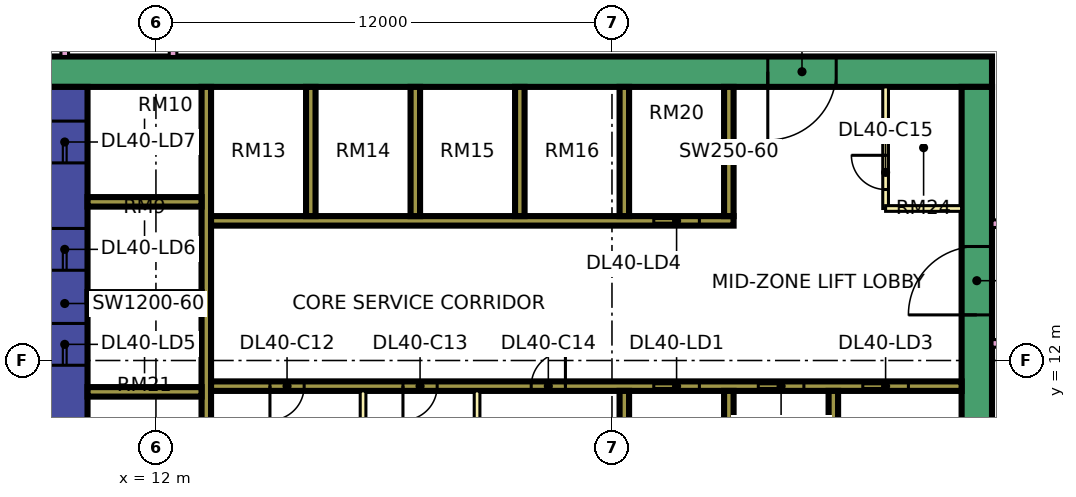
"""IFC4 building model, lengths in metres.
Left out: names, types, materials, properties, quantities, classifications, styles, units other than length and angle.
Written with IfcOpenShell. Run it as: python <this file> out.ifc"""

import sys

from ifc_helpers import new_model, si_unit, direction, frame, frame_2d, origin, place, context, subcontext, project, spatial, rectangle, extrude, element, fill, save


model = new_model("IFC4")
c1 = context("Model", 3, precision=1e-05, world=origin(), true_north=direction((0.0, 1.0)))
c2 = subcontext(c1, "Body", "Model", "MODEL_VIEW")
j1 = project(units=[si_unit("LENGTHUNIT", "METRE"), si_unit("PLANEANGLEUNIT", "RADIAN")], contexts=[c1])
p1 = place(None, origin())
s1 = spatial("IfcSite", under=j1, at=p1, CompositionType="ELEMENT")
p2 = place(p1, origin())
s2 = spatial("IfcBuilding", under=s1, at=p2, CompositionType="ELEMENT")
p3 = place(p2, frame((0.0, 0.0, 176.15)))
s3 = spatial("IfcBuildingStorey", under=s2, at=p3, CompositionType="ELEMENT", Elevation=176.15)
p4 = place(p3, frame((9.0, 19.6, 0.0), z_axis=(0.0, 0.0, 1.0), x_axis=(1.0, 0.0, 0.0)))
e1 = element("IfcWall", 1, at=p4, inside=s3, PredefinedType="SHEAR", context=c2, shape_type="SweptSolid", body=[
    extrude(rectangle(XDim=25.0, YDim=0.8, at=frame_2d((12.5, 0.0))), origin(), (0.0, 0.0, 1.0), 3.75),
])
p5 = place(p4, frame((19.1, 0.0, 0.0)))
e2 = element("IfcOpeningElement", 2, at=p5, cuts=e1, PredefinedType="OPENING", context=c2, shape_type="SweptSolid", body=[
    extrude(rectangle(XDim=1.8, YDim=2.4, at=frame_2d((0.9, 1.2))), frame((0.0, 0.41, 0.0), z_axis=(0.0, -1.0, 0.0), x_axis=(1.0, 0.0, 0.0)), (0.0, 0.0, 1.0), 0.82),
])
p6 = place(p3, frame((9.6, 7.8, 0.0), z_axis=(0.0, 0.0, 1.0), x_axis=(0.0, 1.0, 0.0)))
e3 = element("IfcWall", 3, at=p6, inside=s3, PredefinedType="SHEAR", context=c2, shape_type="SweptSolid", body=[
    extrude(rectangle(XDim=11.4, YDim=1.2, at=frame_2d((5.7, 0.0))), origin(), (0.0, 0.0, 1.0), 3.75),
])
p7 = place(p6, frame((4.075, 0.0, 0.0)))
e4 = element("IfcOpeningElement", 4, at=p7, cuts=e3, PredefinedType="OPENING", context=c2, shape_type="SweptSolid", body=[
    extrude(rectangle(XDim=1.1, YDim=2.2, at=frame_2d((0.55, 1.1))), frame((0.0, 0.61, 0.0), z_axis=(0.0, -1.0, 0.0), x_axis=(1.0, 0.0, 0.0)), (0.0, 0.0, 1.0), 1.22),
])
p8 = place(p6, frame((6.575, 0.0, 0.0)))
e5 = element("IfcOpeningElement", 5, at=p8, cuts=e3, PredefinedType="OPENING", context=c2, shape_type="SweptSolid", body=[
    extrude(rectangle(XDim=1.1, YDim=2.2, at=frame_2d((0.55, 1.1))), frame((0.0, 0.61, 0.0), z_axis=(0.0, -1.0, 0.0), x_axis=(1.0, 0.0, 0.0)), (0.0, 0.0, 1.0), 1.22),
])
p9 = place(p6, frame((9.4, 0.0, 0.0)))
e6 = element("IfcOpeningElement", 6, at=p9, cuts=e3, PredefinedType="OPENING", context=c2, shape_type="SweptSolid", body=[
    extrude(rectangle(XDim=1.1, YDim=2.2, at=frame_2d((0.55, 1.1))), frame((0.0, 0.61, 0.0), z_axis=(0.0, -1.0, 0.0), x_axis=(1.0, 0.0, 0.0)), (0.0, 0.0, 1.0), 1.22),
])
p10 = place(p6, frame((1.75, 0.0, 0.0)))
e7 = element("IfcOpeningElement", 7, at=p10, cuts=e3, PredefinedType="OPENING", context=c2, shape_type="SweptSolid", body=[
    extrude(rectangle(XDim=0.9, YDim=2.1, at=frame_2d((0.45, 1.05))), frame((0.0, 0.61, 0.0), z_axis=(0.0, -1.0, 0.0), x_axis=(1.0, 0.0, 0.0)), (0.0, 0.0, 1.0), 1.22),
])
p11 = place(p3, frame((33.6, 7.8, 0.0), z_axis=(0.0, 0.0, 1.0), x_axis=(0.0, 1.0, 0.0)))
e8 = element("IfcWall", 8, at=p11, inside=s3, PredefinedType="SHEAR", context=c2, shape_type="SweptSolid", body=[
    extrude(rectangle(XDim=11.4, YDim=0.8, at=frame_2d((5.7, 0.0))), origin(), (0.0, 0.0, 1.0), 3.75),
])
p12 = place(p11, frame((5.4, 0.0, 0.0)))
e9 = element("IfcOpeningElement", 9, at=p12, cuts=e8, PredefinedType="OPENING", context=c2, shape_type="SweptSolid", body=[
    extrude(rectangle(XDim=1.8, YDim=2.4, at=frame_2d((0.9, 1.2))), frame((0.0, 0.41, 0.0), z_axis=(0.0, -1.0, 0.0), x_axis=(1.0, 0.0, 0.0)), (0.0, 0.0, 1.0), 0.82),
])
p13 = place(p3, frame((13.325, 7.8, 0.0), z_axis=(0.0, 0.0, 1.0), x_axis=(0.0, 1.0, 0.0)))
e10 = element("IfcWall", 10, at=p13, inside=s3, PredefinedType="SHEAR", context=c2, shape_type="SweptSolid", body=[
    extrude(rectangle(XDim=11.4, YDim=0.25, at=frame_2d((5.7, 0.0))), origin(), (0.0, 0.0, 1.0), 3.75),
])
p14 = place(p3, frame((13.45, 11.325, 0.0), z_axis=(0.0, 0.0, 1.0), x_axis=(1.0, 0.0, 0.0)))
e11 = element("IfcWall", 11, at=p14, inside=s3, PredefinedType="SHEAR", context=c2, shape_type="SweptSolid", body=[
    extrude(rectangle(XDim=19.75, YDim=0.25, at=frame_2d((9.875, 0.0))), origin(), (0.0, 0.0, 1.0), 3.75),
])
p15 = place(p14, frame((11.65, 0.0, 0.0)))
e12 = element("IfcOpeningElement", 12, at=p15, cuts=e11, PredefinedType="OPENING", context=c2, shape_type="SweptSolid", body=[
    extrude(rectangle(XDim=1.2, YDim=2.2, at=frame_2d((0.6, 1.1))), frame((0.0, 0.135, 0.0), z_axis=(0.0, -1.0, 0.0), x_axis=(1.0, 0.0, 0.0)), (0.0, 0.0, 1.0), 0.27),
])
p16 = place(p14, frame((14.4, 0.0, 0.0)))
e13 = element("IfcOpeningElement", 13, at=p16, cuts=e11, PredefinedType="OPENING", context=c2, shape_type="SweptSolid", body=[
    extrude(rectangle(XDim=1.2, YDim=2.2, at=frame_2d((0.6, 1.1))), frame((0.0, 0.135, 0.0), z_axis=(0.0, -1.0, 0.0), x_axis=(1.0, 0.0, 0.0)), (0.0, 0.0, 1.0), 0.27),
])
p17 = place(p14, frame((17.15, 0.0, 0.0)))
e14 = element("IfcOpeningElement", 14, at=p17, cuts=e11, PredefinedType="OPENING", context=c2, shape_type="SweptSolid", body=[
    extrude(rectangle(XDim=1.2, YDim=2.2, at=frame_2d((0.6, 1.1))), frame((0.0, 0.135, 0.0), z_axis=(0.0, -1.0, 0.0), x_axis=(1.0, 0.0, 0.0)), (0.0, 0.0, 1.0), 0.27),
])
p18 = place(p14, frame((1.55, 0.0, 0.0)))
e15 = element("IfcOpeningElement", 15, at=p18, cuts=e11, PredefinedType="OPENING", context=c2, shape_type="SweptSolid", body=[
    extrude(rectangle(XDim=0.9, YDim=2.1, at=frame_2d((0.45, 1.05))), frame((0.0, 0.135, 0.0), z_axis=(0.0, -1.0, 0.0), x_axis=(1.0, 0.0, 0.0)), (0.0, 0.0, 1.0), 0.27),
])
p19 = place(p14, frame((5.05, 0.0, 0.0)))
e16 = element("IfcOpeningElement", 16, at=p19, cuts=e11, PredefinedType="OPENING", context=c2, shape_type="SweptSolid", body=[
    extrude(rectangle(XDim=0.9, YDim=2.1, at=frame_2d((0.45, 1.05))), frame((0.0, 0.135, 0.0), z_axis=(0.0, -1.0, 0.0), x_axis=(1.0, 0.0, 0.0)), (0.0, 0.0, 1.0), 0.27),
])
p20 = place(p14, frame((8.425, 0.0, 0.0)))
e17 = element("IfcOpeningElement", 17, at=p20, cuts=e11, PredefinedType="OPENING", context=c2, shape_type="SweptSolid", body=[
    extrude(rectangle(XDim=0.9, YDim=2.1, at=frame_2d((0.45, 1.05))), frame((0.0, 0.135, 0.0), z_axis=(0.0, -1.0, 0.0), x_axis=(1.0, 0.0, 0.0)), (0.0, 0.0, 1.0), 0.27),
])
p21 = place(p3, frame((13.45, 15.675, 0.0), z_axis=(0.0, 0.0, 1.0), x_axis=(1.0, 0.0, 0.0)))
e18 = element("IfcWall", 18, at=p21, inside=s3, PredefinedType="SHEAR", context=c2, shape_type="SweptSolid", body=[
    extrude(rectangle(XDim=13.75, YDim=0.25, at=frame_2d((6.875, 0.0))), origin(), (0.0, 0.0, 1.0), 3.75),
])
p22 = place(p21, frame((11.65, 0.0, 0.0)))
e19 = element("IfcOpeningElement", 19, at=p22, cuts=e18, PredefinedType="OPENING", context=c2, shape_type="SweptSolid", body=[
    extrude(rectangle(XDim=1.2, YDim=2.2, at=frame_2d((0.6, 1.1))), frame((0.0, 0.135, 0.0), z_axis=(0.0, -1.0, 0.0), x_axis=(1.0, 0.0, 0.0)), (0.0, 0.0, 1.0), 0.27),
])
for number, where, z_axis, x_axis in (
    (20, (10.2, 11.175, 0.0), (0.0, 0.0, 1.0), (1.0, 0.0, 0.0)),
    (21, (10.2, 13.675, 0.0), (0.0, 0.0, 1.0), (1.0, 0.0, 0.0)),
    (22, (10.2, 16.175, 0.0), (0.0, 0.0, 1.0), (1.0, 0.0, 0.0)),
):
    element("IfcWall", number, at=place(p3, frame(where, z_axis=z_axis, x_axis=x_axis)), inside=s3, PredefinedType="SHEAR", context=c2, shape_type="SweptSolid", body=[
        extrude(rectangle(XDim=3.0, YDim=0.25, at=frame_2d((1.5, 0.0))), origin(), (0.0, 0.0, 1.0), 3.75),
    ])
for number, where, z_axis, x_axis in (
    (23, (24.325, 7.8, 0.0), (0.0, 0.0, 1.0), (0.0, 1.0, 0.0)),
    (24, (27.075, 7.8, 0.0), (0.0, 0.0, 1.0), (0.0, 1.0, 0.0)),
    (25, (29.825, 7.8, 0.0), (0.0, 0.0, 1.0), (0.0, 1.0, 0.0)),
    (26, (16.075, 15.8, 0.0), (0.0, 0.0, 1.0), (0.0, 1.0, 0.0)),
    (27, (18.825, 15.8, 0.0), (0.0, 0.0, 1.0), (0.0, 1.0, 0.0)),
    (28, (21.575, 15.8, 0.0), (0.0, 0.0, 1.0), (0.0, 1.0, 0.0)),
    (29, (24.325, 15.8, 0.0), (0.0, 0.0, 1.0), (0.0, 1.0, 0.0)),
    (30, (27.075, 15.8, 0.0), (0.0, 0.0, 1.0), (0.0, 1.0, 0.0)),
):
    element("IfcWall", number, at=place(p3, frame(where, z_axis=z_axis, x_axis=x_axis)), inside=s3, PredefinedType="SHEAR", context=c2, shape_type="SweptSolid", body=[
        extrude(rectangle(XDim=3.4, YDim=0.25, at=frame_2d((1.7, 0.0))), origin(), (0.0, 0.0, 1.0), 3.75),
    ])
p23 = place(p3, frame((-1.447, 12.553, 0.0), z_axis=(0.0, 0.0, 1.0), x_axis=(0.707106781187, -0.707106781187, 0.0)))
e31 = element("IfcWall", 31, at=p23, inside=s3, PredefinedType="SOLIDWALL", context=c2, shape_type="SweptSolid", body=[
    extrude(rectangle(XDim=19.799, YDim=0.15, at=frame_2d((9.899, 0.0))), origin(), (0.0, 0.0, 1.0), 3.35),
])
p24 = place(p23, frame((2.212, 0.0, 0.45)))
e32 = element("IfcOpeningElement", 32, at=p24, cuts=e31, PredefinedType="OPENING", context=c2, shape_type="SweptSolid", body=[
    extrude(rectangle(XDim=3.0, YDim=2.4, at=frame_2d((1.5, 1.2))), frame((0.0, 0.085, 0.0), z_axis=(0.0, -1.0, 0.0), x_axis=(1.0, 0.0, 0.0)), (0.0, 0.0, 1.0), 0.17),
])
p25 = place(p23, frame((10.216, 0.0, 0.45)))
e33 = element("IfcOpeningElement", 33, at=p25, cuts=e31, PredefinedType="OPENING", context=c2, shape_type="SweptSolid", body=[
    extrude(rectangle(XDim=3.0, YDim=2.4, at=frame_2d((1.5, 1.2))), frame((0.0, 0.085, 0.0), z_axis=(0.0, -1.0, 0.0), x_axis=(1.0, 0.0, 0.0)), (0.0, 0.0, 1.0), 0.17),
])
for number, where, z_axis, x_axis in (
    (34, (17.45, 7.8, 0.0), (0.0, 0.0, 1.0), (0.0, 1.0, 0.0)),
    (35, (20.45, 7.8, 0.0), (0.0, 0.0, 1.0), (0.0, 1.0, 0.0)),
):
    element("IfcWall", number, at=place(p3, frame(where, z_axis=z_axis, x_axis=x_axis)), inside=s3, PredefinedType="PARTITIONING", context=c2, shape_type="SweptSolid", body=[
        extrude(rectangle(XDim=3.4, YDim=0.15, at=frame_2d((1.7, 0.0))), origin(), (0.0, 0.0, 1.0), 3.35),
    ])
p26 = place(p3, frame((31.2, 16.0, 0.0), z_axis=(0.0, 0.0, 1.0), x_axis=(0.0, 1.0, 0.0)))
e36 = element("IfcWall", 36, at=p26, inside=s3, PredefinedType="PARTITIONING", context=c2, shape_type="SweptSolid", body=[
    extrude(rectangle(XDim=3.2, YDim=0.15, at=frame_2d((1.6, 0.0))), origin(), (0.0, 0.0, 1.0), 3.35),
])
p27 = place(p26, frame((0.5, 0.0, 0.0)))
e37 = element("IfcOpeningElement", 37, at=p27, cuts=e36, PredefinedType="OPENING", context=c2, shape_type="SweptSolid", body=[
    extrude(rectangle(XDim=0.9, YDim=2.1, at=frame_2d((0.45, 1.05))), frame((0.0, 0.085, 0.0), z_axis=(0.0, -1.0, 0.0), x_axis=(1.0, 0.0, 0.0)), (0.0, 0.0, 1.0), 0.17),
])
p28 = place(p3, frame((31.2, 16.0, 0.0), z_axis=(0.0, 0.0, 1.0), x_axis=(1.0, 0.0, 0.0)))
e38 = element("IfcWall", 38, at=p28, inside=s3, PredefinedType="PARTITIONING", context=c2, shape_type="SweptSolid", body=[
    extrude(rectangle(XDim=2.0, YDim=0.15, at=frame_2d((1.0, 0.0))), origin(), (0.0, 0.0, 1.0), 3.35),
])
p29 = place(p3, frame((9.6, 20.0, 0.0), z_axis=(0.0, 0.0, 1.0), x_axis=(0.0, 1.0, 0.0)))
e39 = element("IfcWall", 39, at=p29, inside=s3, PredefinedType="PARTITIONING", context=c2, shape_type="SweptSolid", body=[
    extrude(rectangle(XDim=42.926, YDim=0.2, at=frame_2d((21.463, 0.0))), origin(), (0.0, 0.0, 1.0), 3.35),
])
p30 = place(p29, frame((31.35, 0.0, 0.0)))
e40 = element("IfcOpeningElement", 40, at=p30, cuts=e39, PredefinedType="OPENING", context=c2, shape_type="SweptSolid", body=[
    extrude(rectangle(XDim=1.0, YDim=2.1, at=frame_2d((0.5, 1.05))), frame((0.0, 0.11, 0.0), z_axis=(0.0, -1.0, 0.0), x_axis=(1.0, 0.0, 0.0)), (0.0, 0.0, 1.0), 0.22),
])
p31 = place(p29, frame((0.6, 0.0, 0.0)))
e41 = element("IfcOpeningElement", 41, at=p31, cuts=e39, PredefinedType="OPENING", context=c2, shape_type="SweptSolid", body=[
    extrude(rectangle(XDim=1.2, YDim=2.1, at=frame_2d((0.6, 1.05))), frame((0.0, 0.11, 0.0), z_axis=(0.0, -1.0, 0.0), x_axis=(1.0, 0.0, 0.0)), (0.0, 0.0, 1.0), 0.22),
])
p32 = place(p29, frame((3.9, 0.0, 0.0)))
e42 = element("IfcOpeningElement", 42, at=p32, cuts=e39, PredefinedType="OPENING", context=c2, shape_type="SweptSolid", body=[
    extrude(rectangle(XDim=1.0, YDim=2.1, at=frame_2d((0.5, 1.05))), frame((0.0, 0.11, 0.0), z_axis=(0.0, -1.0, 0.0), x_axis=(1.0, 0.0, 0.0)), (0.0, 0.0, 1.0), 0.22),
])
p33 = place(p3, frame((12.45, 20.0, 0.0), z_axis=(0.0, 0.0, 1.0), x_axis=(0.0, 1.0, 0.0)))
e43 = element("IfcWall", 43, at=p33, inside=s3, PredefinedType="PARTITIONING", context=c2, shape_type="SweptSolid", body=[
    extrude(rectangle(XDim=43.0, YDim=0.2, at=frame_2d((21.5, 0.0))), origin(), (0.0, 0.0, 1.0), 3.35),
])
p34 = place(p33, frame((5.95, 0.0, 0.0)))
e44 = element("IfcOpeningElement", 44, at=p34, cuts=e43, PredefinedType="OPENING", context=c2, shape_type="SweptSolid", body=[
    extrude(rectangle(XDim=1.0, YDim=2.1, at=frame_2d((0.5, 1.05))), frame((0.0, 0.11, 0.0), z_axis=(0.0, -1.0, 0.0), x_axis=(1.0, 0.0, 0.0)), (0.0, 0.0, 1.0), 0.22),
])
p35 = place(p33, frame((12.0, 0.0, 0.0)))
e45 = element("IfcOpeningElement", 45, at=p35, cuts=e43, PredefinedType="OPENING", context=c2, shape_type="SweptSolid", body=[
    extrude(rectangle(XDim=1.0, YDim=2.1, at=frame_2d((0.5, 1.05))), frame((0.0, 0.11, 0.0), z_axis=(0.0, -1.0, 0.0), x_axis=(1.0, 0.0, 0.0)), (0.0, 0.0, 1.0), 0.22),
])
p36 = place(p33, frame((22.75, 0.0, 0.0)))
e46 = element("IfcOpeningElement", 46, at=p36, cuts=e43, PredefinedType="OPENING", context=c2, shape_type="SweptSolid", body=[
    extrude(rectangle(XDim=1.0, YDim=2.1, at=frame_2d((0.5, 1.05))), frame((0.0, 0.11, 0.0), z_axis=(0.0, -1.0, 0.0), x_axis=(1.0, 0.0, 0.0)), (0.0, 0.0, 1.0), 0.22),
])
p37 = place(p33, frame((34.75, 0.0, 0.0)))
e47 = element("IfcOpeningElement", 47, at=p37, cuts=e43, PredefinedType="OPENING", context=c2, shape_type="SweptSolid", body=[
    extrude(rectangle(XDim=1.0, YDim=2.1, at=frame_2d((0.5, 1.05))), frame((0.0, 0.11, 0.0), z_axis=(0.0, -1.0, 0.0), x_axis=(1.0, 0.0, 0.0)), (0.0, 0.0, 1.0), 0.22),
])
p38 = place(p33, frame((1.15, 0.0, 0.0)))
e48 = element("IfcOpeningElement", 48, at=p38, cuts=e43, PredefinedType="OPENING", context=c2, shape_type="SweptSolid", body=[
    extrude(rectangle(XDim=1.8, YDim=2.1, at=frame_2d((0.9, 1.05))), frame((0.0, 0.11, 0.0), z_axis=(0.0, -1.0, 0.0), x_axis=(1.0, 0.0, 0.0)), (0.0, 0.0, 1.0), 0.22),
])
p39 = place(p33, frame((28.6, 0.0, 0.0)))
e49 = element("IfcOpeningElement", 49, at=p39, cuts=e43, PredefinedType="OPENING", context=c2, shape_type="SweptSolid", body=[
    extrude(rectangle(XDim=1.8, YDim=2.1, at=frame_2d((0.9, 1.05))), frame((0.0, 0.11, 0.0), z_axis=(0.0, -1.0, 0.0), x_axis=(1.0, 0.0, 0.0)), (0.0, 0.0, 1.0), 0.22),
])
p40 = place(p3, frame((34.0, 12.45, 0.0), z_axis=(0.0, 0.0, 1.0), x_axis=(1.0, 0.0, 0.0)))
e50 = element("IfcWall", 50, at=p40, inside=s3, PredefinedType="PARTITIONING", context=c2, shape_type="SweptSolid", body=[
    extrude(rectangle(XDim=2.451, YDim=0.2, at=frame_2d((1.226, 0.0))), origin(), (0.0, 0.0, 1.0), 3.35),
])
p41 = place(p3, frame((34.0, 15.6, 0.0), z_axis=(0.0, 0.0, 1.0), x_axis=(1.0, 0.0, 0.0)))
e51 = element("IfcWall", 51, at=p41, inside=s3, PredefinedType="PARTITIONING", context=c2, shape_type="SweptSolid", body=[
    extrude(rectangle(XDim=10.35, YDim=0.2, at=frame_2d((5.175, 0.0))), origin(), (0.0, 0.0, 1.0), 3.35),
])
p42 = place(p41, frame((5.6, 0.0, 0.0)))
e52 = element("IfcOpeningElement", 52, at=p42, cuts=e51, PredefinedType="OPENING", context=c2, shape_type="SweptSolid", body=[
    extrude(rectangle(XDim=1.0, YDim=2.1, at=frame_2d((0.5, 1.05))), frame((0.0, 0.11, 0.0), z_axis=(0.0, -1.0, 0.0), x_axis=(1.0, 0.0, 0.0)), (0.0, 0.0, 1.0), 0.22),
])
p43 = place(p41, frame((0.45, 0.0, 0.0)))
e53 = element("IfcOpeningElement", 53, at=p43, cuts=e51, PredefinedType="OPENING", context=c2, shape_type="SweptSolid", body=[
    extrude(rectangle(XDim=1.2, YDim=2.1, at=frame_2d((0.6, 1.05))), frame((0.0, 0.11, 0.0), z_axis=(0.0, -1.0, 0.0), x_axis=(1.0, 0.0, 0.0)), (0.0, 0.0, 1.0), 0.22),
])
p44 = place(p15, origin())
e54 = element("IfcDoor", 54, at=p44, inside=s3, OperationType="DOUBLE_DOOR_SLIDING", PredefinedType="DOOR", context=c2, shape_type="SweptSolid", body=[
    extrude(rectangle(XDim=1.2, YDim=2.2, at=frame_2d((0.6, 1.1))), frame((0.0, 0.025, 0.0), z_axis=(0.0, -1.0, 0.0), x_axis=(1.0, 0.0, 0.0)), (0.0, 0.0, 1.0), 0.05),
])
fill(e12, e54)
p45 = place(p16, origin())
e55 = element("IfcDoor", 55, at=p45, inside=s3, OperationType="DOUBLE_DOOR_SLIDING", PredefinedType="DOOR", context=c2, shape_type="SweptSolid", body=[
    extrude(rectangle(XDim=1.2, YDim=2.2, at=frame_2d((0.6, 1.1))), frame((0.0, 0.025, 0.0), z_axis=(0.0, -1.0, 0.0), x_axis=(1.0, 0.0, 0.0)), (0.0, 0.0, 1.0), 0.05),
])
fill(e13, e55)
p46 = place(p17, origin())
e56 = element("IfcDoor", 56, at=p46, inside=s3, OperationType="DOUBLE_DOOR_SLIDING", PredefinedType="DOOR", context=c2, shape_type="SweptSolid", body=[
    extrude(rectangle(XDim=1.2, YDim=2.2, at=frame_2d((0.6, 1.1))), frame((0.0, 0.025, 0.0), z_axis=(0.0, -1.0, 0.0), x_axis=(1.0, 0.0, 0.0)), (0.0, 0.0, 1.0), 0.05),
])
fill(e14, e56)
p47 = place(p22, origin())
e57 = element("IfcDoor", 57, at=p47, inside=s3, OperationType="DOUBLE_DOOR_SLIDING", PredefinedType="DOOR", context=c2, shape_type="SweptSolid", body=[
    extrude(rectangle(XDim=1.2, YDim=2.2, at=frame_2d((0.6, 1.1))), frame((0.0, 0.025, 0.0), z_axis=(0.0, -1.0, 0.0), x_axis=(1.0, 0.0, 0.0)), (0.0, 0.0, 1.0), 0.05),
])
fill(e19, e57)
p48 = place(p7, origin())
e58 = element("IfcDoor", 58, at=p48, inside=s3, OperationType="DOUBLE_DOOR_SLIDING", PredefinedType="DOOR", context=c2, shape_type="SweptSolid", body=[
    extrude(rectangle(XDim=1.1, YDim=2.2, at=frame_2d((0.55, 1.1))), frame((0.0, 0.025, 0.0), z_axis=(0.0, -1.0, 0.0), x_axis=(1.0, 0.0, 0.0)), (0.0, 0.0, 1.0), 0.05),
])
fill(e4, e58)
p49 = place(p8, origin())
e59 = element("IfcDoor", 59, at=p49, inside=s3, OperationType="DOUBLE_DOOR_SLIDING", PredefinedType="DOOR", context=c2, shape_type="SweptSolid", body=[
    extrude(rectangle(XDim=1.1, YDim=2.2, at=frame_2d((0.55, 1.1))), frame((0.0, 0.025, 0.0), z_axis=(0.0, -1.0, 0.0), x_axis=(1.0, 0.0, 0.0)), (0.0, 0.0, 1.0), 0.05),
])
fill(e5, e59)
p50 = place(p9, origin())
e60 = element("IfcDoor", 60, at=p50, inside=s3, OperationType="DOUBLE_DOOR_SLIDING", PredefinedType="DOOR", context=c2, shape_type="SweptSolid", body=[
    extrude(rectangle(XDim=1.1, YDim=2.2, at=frame_2d((0.55, 1.1))), frame((0.0, 0.025, 0.0), z_axis=(0.0, -1.0, 0.0), x_axis=(1.0, 0.0, 0.0)), (0.0, 0.0, 1.0), 0.05),
])
fill(e6, e60)
p51 = place(p12, origin())
e61 = element("IfcDoor", 61, at=p51, inside=s3, OperationType="DOUBLE_DOOR_SINGLE_SWING", PredefinedType="DOOR", context=c2, shape_type="SweptSolid", body=[
    extrude(rectangle(XDim=1.8, YDim=2.4, at=frame_2d((0.9, 1.2))), frame((0.0, 0.025, 0.0), z_axis=(0.0, -1.0, 0.0), x_axis=(1.0, 0.0, 0.0)), (0.0, 0.0, 1.0), 0.05),
])
fill(e9, e61)
p52 = place(p5, frame((1.8, 0.0, 0.0), z_axis=(0.0, 0.0, 1.0), x_axis=(-1.0, 0.0, 0.0)))
e62 = element("IfcDoor", 62, at=p52, inside=s3, OperationType="DOUBLE_DOOR_SINGLE_SWING", PredefinedType="DOOR", context=c2, shape_type="SweptSolid", body=[
    extrude(rectangle(XDim=1.8, YDim=2.4, at=frame_2d((0.9, 1.2))), frame((0.0, 0.025, 0.0), z_axis=(0.0, -1.0, 0.0), x_axis=(1.0, 0.0, 0.0)), (0.0, 0.0, 1.0), 0.05),
])
fill(e2, e62)
p53 = place(p18, frame((0.9, 0.0, 0.0), z_axis=(0.0, 0.0, 1.0), x_axis=(-1.0, 0.0, 0.0)))
e63 = element("IfcDoor", 63, at=p53, inside=s3, OperationType="SINGLE_SWING_LEFT", PredefinedType="DOOR", context=c2, shape_type="SweptSolid", body=[
    extrude(rectangle(XDim=0.9, YDim=2.1, at=frame_2d((0.45, 1.05))), frame((0.0, 0.025, 0.0), z_axis=(0.0, -1.0, 0.0), x_axis=(1.0, 0.0, 0.0)), (0.0, 0.0, 1.0), 0.05),
])
fill(e15, e63)
p54 = place(p19, frame((0.9, 0.0, 0.0), z_axis=(0.0, 0.0, 1.0), x_axis=(-1.0, 0.0, 0.0)))
e64 = element("IfcDoor", 64, at=p54, inside=s3, OperationType="SINGLE_SWING_LEFT", PredefinedType="DOOR", context=c2, shape_type="SweptSolid", body=[
    extrude(rectangle(XDim=0.9, YDim=2.1, at=frame_2d((0.45, 1.05))), frame((0.0, 0.025, 0.0), z_axis=(0.0, -1.0, 0.0), x_axis=(1.0, 0.0, 0.0)), (0.0, 0.0, 1.0), 0.05),
])
fill(e16, e64)
p55 = place(p20, frame((0.9, 0.0, 0.0), z_axis=(0.0, 0.0, 1.0), x_axis=(-1.0, 0.0, 0.0)))
e65 = element("IfcDoor", 65, at=p55, inside=s3, OperationType="SINGLE_SWING_RIGHT", PredefinedType="DOOR", context=c2, shape_type="SweptSolid", body=[
    extrude(rectangle(XDim=0.9, YDim=2.1, at=frame_2d((0.45, 1.05))), frame((0.0, 0.025, 0.0), z_axis=(0.0, -1.0, 0.0), x_axis=(1.0, 0.0, 0.0)), (0.0, 0.0, 1.0), 0.05),
])
fill(e17, e65)
p56 = place(p27, frame((0.9, 0.0, 0.0), z_axis=(0.0, 0.0, 1.0), x_axis=(-1.0, 0.0, 0.0)))
e66 = element("IfcDoor", 66, at=p56, inside=s3, OperationType="SINGLE_SWING_RIGHT", PredefinedType="DOOR", context=c2, shape_type="SweptSolid", body=[
    extrude(rectangle(XDim=0.9, YDim=2.1, at=frame_2d((0.45, 1.05))), frame((0.0, 0.025, 0.0), z_axis=(0.0, -1.0, 0.0), x_axis=(1.0, 0.0, 0.0)), (0.0, 0.0, 1.0), 0.05),
])
fill(e37, e66)
save(model, sys.argv[1])
